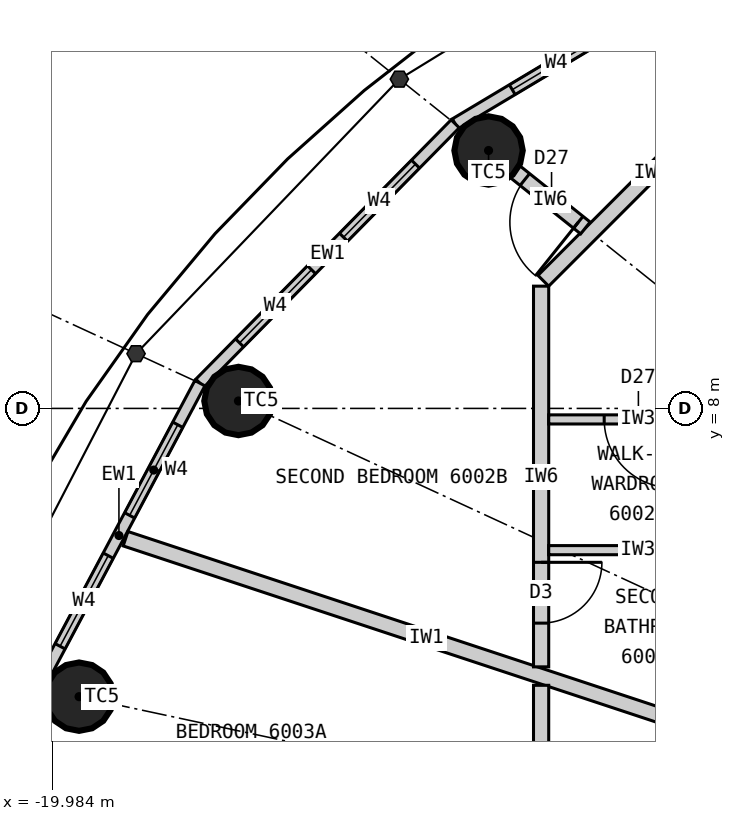
"""IFC4 building model, lengths in metres.
Left out: names, types, materials, properties, quantities, classifications, styles, units other than length and angle.
Written with IfcOpenShell. Run it as: python <this file> out.ifc"""

import sys

from ifc_helpers import new_model, si_unit, direction, frame, frame_2d, origin, origin_2d, place, context, subcontext, project, spatial, rectangle, circle, extrude, element, fill, save


model = new_model("IFC4")
c1 = context("Model", 3, precision=1e-05, world=origin(), true_north=direction((0.0, 1.0)))
c2 = subcontext(c1, "Body", "Model", "MODEL_VIEW")
j1 = project(units=[si_unit("LENGTHUNIT", "METRE"), si_unit("PLANEANGLEUNIT", "RADIAN")], contexts=[c1])
p1 = place(None, origin())
s1 = spatial("IfcSite", under=j1, at=p1, CompositionType="ELEMENT")
p2 = place(p1, origin())
s2 = spatial("IfcBuilding", under=s1, at=p2, CompositionType="ELEMENT")
p3 = place(p2, frame((0.0, 0.0, 222.6)))
s3 = spatial("IfcBuildingStorey", under=s2, at=p3, CompositionType="ELEMENT", Elevation=222.6)
for number, where, z_axis, x_axis in (
    (1, (-14.241, 11.393, 0.0), (0.0, 0.0, 1.0), (1.0, 0.0, 0.0)),
    (2, (-17.532, 8.098, 0.0), (0.0, 0.0, 1.0), (1.0, 0.0, 0.0)),
    (3, (-19.629, 4.208, 0.0), (0.0, 0.0, 1.0), (1.0, 0.0, 0.0)),
):
    element("IfcColumn", number, at=place(p3, frame(where, z_axis=z_axis, x_axis=x_axis)), inside=s3, PredefinedType="COLUMN", context=c2, shape_type="SweptSolid", body=[
        extrude(circle(Radius=0.45, at=origin_2d()), origin(), (0.0, 0.0, 1.0), 3.3),
    ])
p4 = place(p3, frame((-10.346, 14.336, 0.0), z_axis=(0.0, 0.0, 1.0), x_axis=(-0.85822150553, -0.513279502265, 0.0)))
e4 = element("IfcWall", 4, at=p4, inside=s3, PredefinedType="ELEMENTEDWALL", context=c2, shape_type="SweptSolid", body=[
    extrude(rectangle(XDim=5.05, YDim=0.15, at=frame_2d((2.525, 0.0))), origin(), (0.0, 0.0, 1.0), 3.12),
])
p5 = place(p4, frame((0.875, 0.0, 0.9)))
e5 = element("IfcOpeningElement", 5, at=p5, cuts=e4, PredefinedType="OPENING", context=c2, shape_type="SweptSolid", body=[
    extrude(rectangle(XDim=1.35, YDim=1.9, at=frame_2d((0.675, 0.95))), frame((0.0, 0.085, 0.0), z_axis=(0.0, -1.0, 0.0), x_axis=(1.0, 0.0, 0.0)), (0.0, 0.0, 1.0), 0.17),
])
p6 = place(p4, frame((2.825, 0.0, 0.9)))
e6 = element("IfcOpeningElement", 6, at=p6, cuts=e4, PredefinedType="OPENING", context=c2, shape_type="SweptSolid", body=[
    extrude(rectangle(XDim=1.35, YDim=1.9, at=frame_2d((0.675, 0.95))), frame((0.0, 0.085, 0.0), z_axis=(0.0, -1.0, 0.0), x_axis=(1.0, 0.0, 0.0)), (0.0, 0.0, 1.0), 0.17),
])
p7 = place(p3, frame((-14.68, 11.744, 0.0), z_axis=(0.0, 0.0, 1.0), x_axis=(-0.701527379618, -0.712642501993, 0.0)))
e7 = element("IfcWall", 7, at=p7, inside=s3, PredefinedType="ELEMENTEDWALL", context=c2, shape_type="SweptSolid", body=[
    extrude(rectangle(XDim=4.788, YDim=0.15, at=frame_2d((2.394, 0.0))), origin(), (0.0, 0.0, 1.0), 3.12),
])
p8 = place(p7, frame((0.744, 0.0, 0.9)))
e8 = element("IfcOpeningElement", 8, at=p8, cuts=e7, PredefinedType="OPENING", context=c2, shape_type="SweptSolid", body=[
    extrude(rectangle(XDim=1.35, YDim=1.9, at=frame_2d((0.675, 0.95))), frame((0.0, 0.085, 0.0), z_axis=(0.0, -1.0, 0.0), x_axis=(1.0, 0.0, 0.0)), (0.0, 0.0, 1.0), 0.17),
])
p9 = place(p7, frame((2.694, 0.0, 0.9)))
e9 = element("IfcOpeningElement", 9, at=p9, cuts=e7, PredefinedType="OPENING", context=c2, shape_type="SweptSolid", body=[
    extrude(rectangle(XDim=1.35, YDim=1.9, at=frame_2d((0.675, 0.95))), frame((0.0, 0.085, 0.0), z_axis=(0.0, -1.0, 0.0), x_axis=(1.0, 0.0, 0.0)), (0.0, 0.0, 1.0), 0.17),
])
p10 = place(p3, frame((-18.04, 8.332, 0.0), z_axis=(0.0, 0.0, 1.0), x_axis=(-0.469256152955, -0.883062094597, 0.0)))
e10 = element("IfcWall", 10, at=p10, inside=s3, PredefinedType="ELEMENTEDWALL", context=c2, shape_type="SweptSolid", body=[
    extrude(rectangle(XDim=4.539, YDim=0.15, at=frame_2d((2.27, 0.0))), origin(), (0.0, 0.0, 1.0), 3.12),
])
p11 = place(p10, frame((0.62, 0.0, 0.9)))
e11 = element("IfcOpeningElement", 11, at=p11, cuts=e10, PredefinedType="OPENING", context=c2, shape_type="SweptSolid", body=[
    extrude(rectangle(XDim=1.35, YDim=1.9, at=frame_2d((0.675, 0.95))), frame((0.0, 0.085, 0.0), z_axis=(0.0, -1.0, 0.0), x_axis=(1.0, 0.0, 0.0)), (0.0, 0.0, 1.0), 0.17),
])
p12 = place(p10, frame((2.57, 0.0, 0.9)))
e12 = element("IfcOpeningElement", 12, at=p12, cuts=e10, PredefinedType="OPENING", context=c2, shape_type="SweptSolid", body=[
    extrude(rectangle(XDim=1.35, YDim=1.9, at=frame_2d((0.675, 0.95))), frame((0.0, 0.085, 0.0), z_axis=(0.0, -1.0, 0.0), x_axis=(1.0, 0.0, 0.0)), (0.0, 0.0, 1.0), 0.17),
])
p13 = place(p3, frame((-11.1, 3.669, 0.0), z_axis=(0.0, 0.0, 1.0), x_axis=(-0.949476668397, 0.313837627079, 0.0)))
e13 = element("IfcWall", 13, at=p13, inside=s3, PredefinedType="PARTITIONING", context=c2, shape_type="SweptSolid", body=[
    extrude(rectangle(XDim=8.339, YDim=0.2, at=frame_2d((4.169, 0.0))), origin(), (0.0, 0.0, 1.0), 3.12),
])
p14 = place(p3, frame((-10.679, 12.521, 0.0), z_axis=(0.0, 0.0, 1.0), x_axis=(-0.707106781187, -0.707106781187, 0.0)))
e14 = element("IfcWall", 14, at=p14, inside=s3, PredefinedType="PARTITIONING", context=c2, shape_type="SweptSolid", body=[
    extrude(rectangle(XDim=4.019, YDim=0.2, at=frame_2d((2.009, 0.0))), origin(), (0.0, 0.0, 1.0), 3.12),
])
p15 = place(p3, frame((-13.55, 9.609, 0.0), z_axis=(0.0, 0.0, 1.0), x_axis=(0.0, -1.0, 0.0)))
e15 = element("IfcWall", 15, at=p15, inside=s3, PredefinedType="PARTITIONING", context=c2, shape_type="SweptSolid", body=[
    extrude(rectangle(XDim=5.009, YDim=0.2, at=frame_2d((2.504, 0.0))), origin(), (0.0, 0.0, 1.0), 3.12),
])
p16 = place(p15, frame((3.633, 0.0, 0.0)))
e16 = element("IfcOpeningElement", 16, at=p16, cuts=e15, PredefinedType="OPENING", context=c2, shape_type="SweptSolid", body=[
    extrude(rectangle(XDim=0.8, YDim=2.1, at=frame_2d((0.4, 1.05))), frame((0.0, 0.11, 0.0), z_axis=(0.0, -1.0, 0.0), x_axis=(1.0, 0.0, 0.0)), (0.0, 0.0, 1.0), 0.22),
])
p17 = place(p3, frame((-12.968, 10.374, 0.0), z_axis=(0.0, 0.0, 1.0), x_axis=(-0.780888968944, 0.624669847345, 0.0)))
e17 = element("IfcWall", 17, at=p17, inside=s3, PredefinedType="PARTITIONING", context=c2, shape_type="SweptSolid", body=[
    extrude(rectangle(XDim=1.181, YDim=0.2, at=frame_2d((0.591, 0.0))), origin(), (0.0, 0.0, 1.0), 2.42),
])
p18 = place(p17, frame((0.12, 0.0, 0.0)))
e18 = element("IfcOpeningElement", 18, at=p18, cuts=e17, PredefinedType="OPENING", context=c2, shape_type="SweptSolid", body=[
    extrude(rectangle(XDim=0.9, YDim=2.1, at=frame_2d((0.45, 1.05))), frame((0.0, 0.11, 0.0), z_axis=(0.0, -1.0, 0.0), x_axis=(1.0, 0.0, 0.0)), (0.0, 0.0, 1.0), 0.22),
])
p19 = place(p3, frame((-11.1, 7.855, 0.0), z_axis=(0.0, 0.0, 1.0), x_axis=(-1.0, 0.0, 0.0)))
e19 = element("IfcWall", 19, at=p19, inside=s3, PredefinedType="PARTITIONING", context=c2, shape_type="SweptSolid", body=[
    extrude(rectangle(XDim=2.35, YDim=0.12, at=frame_2d((1.175, 0.0))), origin(), (0.0, 0.0, 1.0), 3.12),
])
p20 = place(p19, frame((0.72, 0.0, 0.0)))
e20 = element("IfcOpeningElement", 20, at=p20, cuts=e19, PredefinedType="OPENING", context=c2, shape_type="SweptSolid", body=[
    extrude(rectangle(XDim=0.9, YDim=2.1, at=frame_2d((0.45, 1.05))), frame((0.0, 0.07, 0.0), z_axis=(0.0, -1.0, 0.0), x_axis=(1.0, 0.0, 0.0)), (0.0, 0.0, 1.0), 0.14),
])
p21 = place(p3, frame((-11.1, 6.135, 0.0), z_axis=(0.0, 0.0, 1.0), x_axis=(-1.0, 0.0, 0.0)))
e21 = element("IfcWall", 21, at=p21, inside=s3, PredefinedType="PARTITIONING", context=c2, shape_type="SweptSolid", body=[
    extrude(rectangle(XDim=2.35, YDim=0.12, at=frame_2d((1.175, 0.0))), origin(), (0.0, 0.0, 1.0), 3.12),
])
p22 = place(p3, frame((-13.55, 4.357, 0.0), z_axis=(0.0, 0.0, 1.0), x_axis=(0.0, -1.0, 0.0)))
e22 = element("IfcWall", 22, at=p22, inside=s3, PredefinedType="PARTITIONING", context=c2, shape_type="SweptSolid", body=[
    extrude(rectangle(XDim=12.496, YDim=0.2, at=frame_2d((6.248, 0.0))), origin(), (0.0, 0.0, 1.0), 3.12),
])
p23 = place(p22, frame((1.92, 0.0, 0.0)))
e23 = element("IfcOpeningElement", 23, at=p23, cuts=e22, PredefinedType="OPENING", context=c2, shape_type="SweptSolid", body=[
    extrude(rectangle(XDim=0.8, YDim=2.1, at=frame_2d((0.4, 1.05))), frame((0.0, 0.11, 0.0), z_axis=(0.0, -1.0, 0.0), x_axis=(1.0, 0.0, 0.0)), (0.0, 0.0, 1.0), 0.22),
])
p24 = place(p22, frame((9.27, 0.0, 0.0)))
e24 = element("IfcOpeningElement", 24, at=p24, cuts=e22, PredefinedType="OPENING", context=c2, shape_type="SweptSolid", body=[
    extrude(rectangle(XDim=0.8, YDim=2.1, at=frame_2d((0.4, 1.05))), frame((0.0, 0.11, 0.0), z_axis=(0.0, -1.0, 0.0), x_axis=(1.0, 0.0, 0.0)), (0.0, 0.0, 1.0), 0.22),
])
p25 = place(p22, frame((5.557, 0.0, 0.0)))
e25 = element("IfcOpeningElement", 25, at=p25, cuts=e22, PredefinedType="OPENING", context=c2, shape_type="SweptSolid", body=[
    extrude(rectangle(XDim=0.9, YDim=2.1, at=frame_2d((0.45, 1.05))), frame((0.0, 0.11, 0.0), z_axis=(0.0, -1.0, 0.0), x_axis=(1.0, 0.0, 0.0)), (0.0, 0.0, 1.0), 0.22),
])
p26 = place(p6, origin())
e26 = element("IfcWindow", 26, at=p26, inside=s3, PartitioningType="SINGLE_PANEL", PredefinedType="WINDOW", context=c2, shape_type="SweptSolid", body=[
    extrude(rectangle(XDim=1.35, YDim=1.9, at=frame_2d((0.675, 0.95))), frame((0.0, 0.03, 0.0), z_axis=(0.0, -1.0, 0.0), x_axis=(1.0, 0.0, 0.0)), (0.0, 0.0, 1.0), 0.06),
])
fill(e6, e26)
p27 = place(p8, origin())
e27 = element("IfcWindow", 27, at=p27, inside=s3, PartitioningType="SINGLE_PANEL", PredefinedType="WINDOW", context=c2, shape_type="SweptSolid", body=[
    extrude(rectangle(XDim=1.35, YDim=1.9, at=frame_2d((0.675, 0.95))), frame((0.0, 0.03, 0.0), z_axis=(0.0, -1.0, 0.0), x_axis=(1.0, 0.0, 0.0)), (0.0, 0.0, 1.0), 0.06),
])
fill(e8, e27)
p28 = place(p9, origin())
e28 = element("IfcWindow", 28, at=p28, inside=s3, PartitioningType="SINGLE_PANEL", PredefinedType="WINDOW", context=c2, shape_type="SweptSolid", body=[
    extrude(rectangle(XDim=1.35, YDim=1.9, at=frame_2d((0.675, 0.95))), frame((0.0, 0.03, 0.0), z_axis=(0.0, -1.0, 0.0), x_axis=(1.0, 0.0, 0.0)), (0.0, 0.0, 1.0), 0.06),
])
fill(e9, e28)
p29 = place(p11, origin())
e29 = element("IfcWindow", 29, at=p29, inside=s3, PartitioningType="SINGLE_PANEL", PredefinedType="WINDOW", context=c2, shape_type="SweptSolid", body=[
    extrude(rectangle(XDim=1.35, YDim=1.9, at=frame_2d((0.675, 0.95))), frame((0.0, 0.03, 0.0), z_axis=(0.0, -1.0, 0.0), x_axis=(1.0, 0.0, 0.0)), (0.0, 0.0, 1.0), 0.06),
])
fill(e11, e29)
p30 = place(p12, origin())
e30 = element("IfcWindow", 30, at=p30, inside=s3, PartitioningType="SINGLE_PANEL", PredefinedType="WINDOW", context=c2, shape_type="SweptSolid", body=[
    extrude(rectangle(XDim=1.35, YDim=1.9, at=frame_2d((0.675, 0.95))), frame((0.0, 0.03, 0.0), z_axis=(0.0, -1.0, 0.0), x_axis=(1.0, 0.0, 0.0)), (0.0, 0.0, 1.0), 0.06),
])
fill(e12, e30)
p31 = place(p20, origin())
e31 = element("IfcDoor", 31, at=p31, inside=s3, OperationType="SINGLE_SWING_LEFT", PredefinedType="DOOR", context=c2, shape_type="SweptSolid", body=[
    extrude(rectangle(XDim=0.9, YDim=2.1, at=frame_2d((0.45, 1.05))), frame((0.0, 0.025, 0.0), z_axis=(0.0, -1.0, 0.0), x_axis=(1.0, 0.0, 0.0)), (0.0, 0.0, 1.0), 0.05),
])
fill(e20, e31)
p32 = place(p16, origin())
e32 = element("IfcDoor", 32, at=p32, inside=s3, OperationType="SINGLE_SWING_LEFT", PredefinedType="DOOR", context=c2, shape_type="SweptSolid", body=[
    extrude(rectangle(XDim=0.8, YDim=2.1, at=frame_2d((0.4, 1.05))), frame((0.0, 0.025, 0.0), z_axis=(0.0, -1.0, 0.0), x_axis=(1.0, 0.0, 0.0)), (0.0, 0.0, 1.0), 0.05),
])
fill(e16, e32)
p33 = place(p18, origin())
e33 = element("IfcDoor", 33, at=p33, inside=s3, OperationType="SINGLE_SWING_LEFT", PredefinedType="DOOR", context=c2, shape_type="SweptSolid", body=[
    extrude(rectangle(XDim=0.9, YDim=2.1, at=frame_2d((0.45, 1.05))), frame((0.0, 0.025, 0.0), z_axis=(0.0, -1.0, 0.0), x_axis=(1.0, 0.0, 0.0)), (0.0, 0.0, 1.0), 0.05),
])
fill(e18, e33)
save(model, sys.argv[1])
